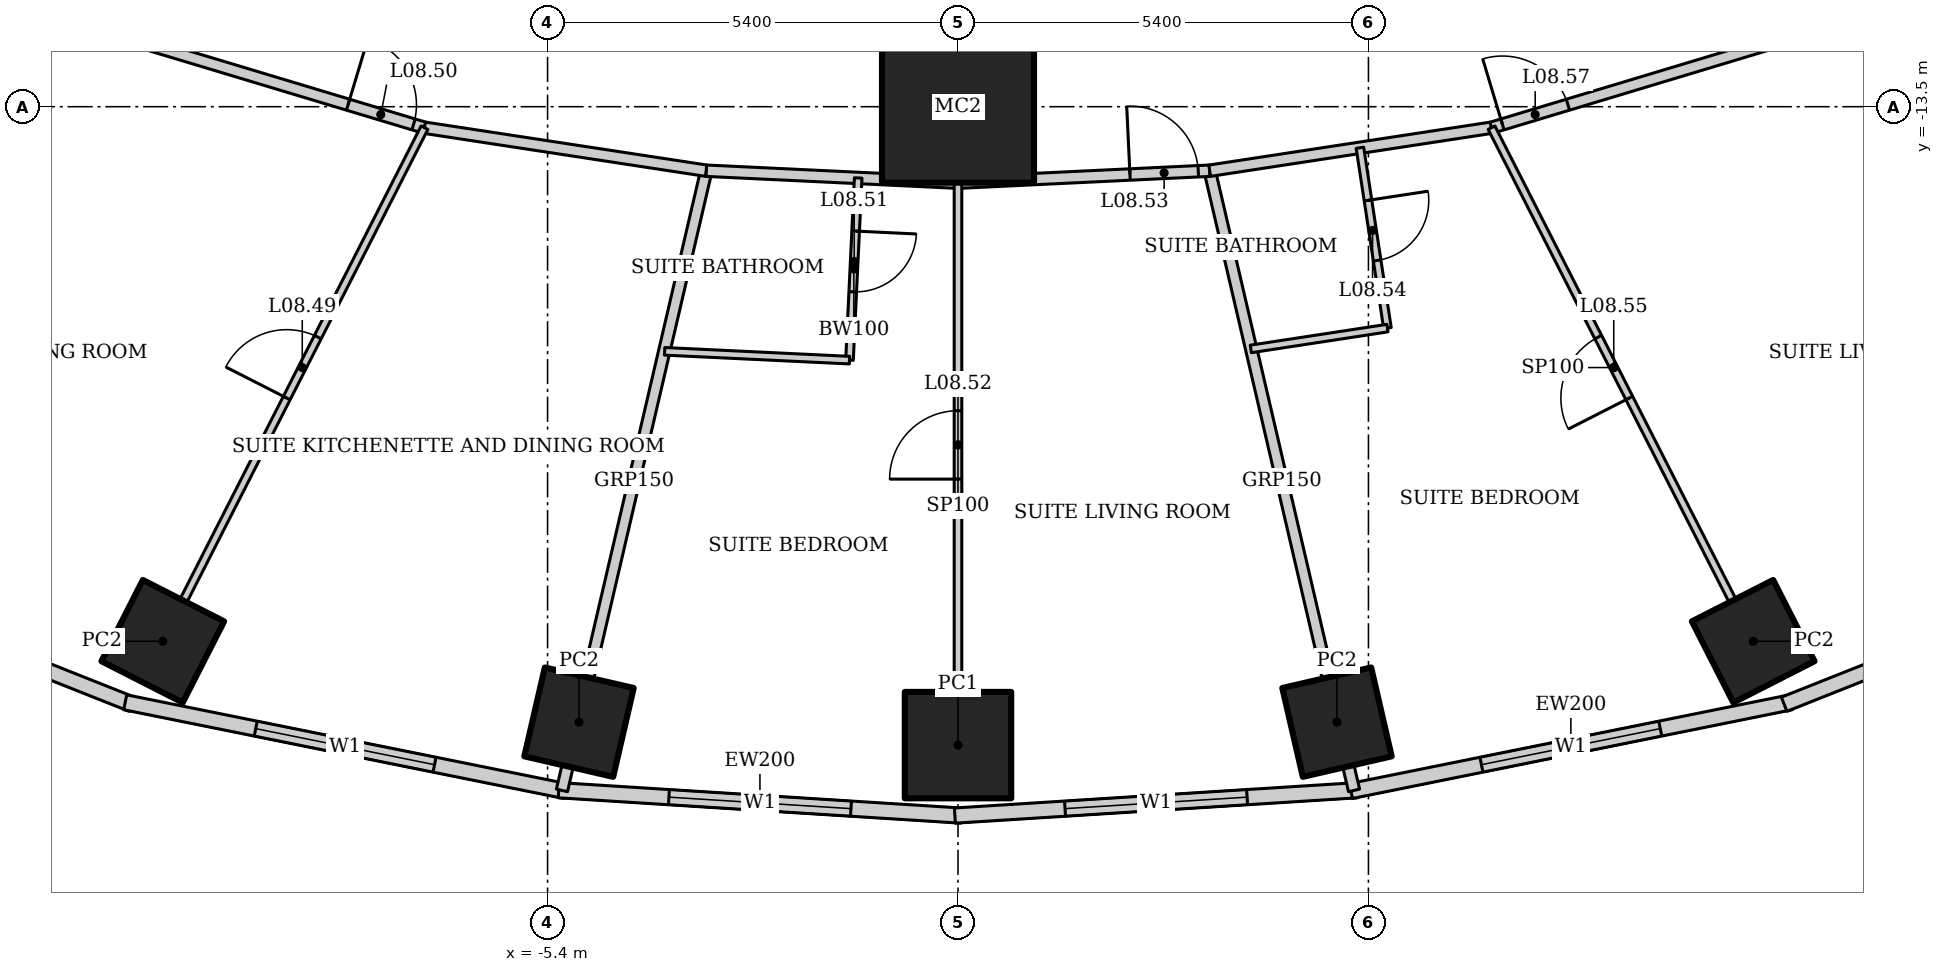
"""IFC4 building model, lengths in metres.
Left out: names, types, materials, properties, quantities, classifications, styles, units other than length and angle.
Written with IfcOpenShell. Run it as: python <this file> out.ifc"""

import sys

from ifc_helpers import new_model, si_unit, direction, frame, frame_2d, origin, origin_2d, place, context, subcontext, project, spatial, rectangle, hollow_rectangle, extrude, element, fill, save


model = new_model("IFC4")
c1 = context("Model", 3, precision=1e-05, world=origin(), true_north=direction((0.0, 1.0)))
c2 = subcontext(c1, "Body", "Model", "MODEL_VIEW")
j1 = project(units=[si_unit("LENGTHUNIT", "METRE"), si_unit("PLANEANGLEUNIT", "RADIAN")], contexts=[c1])
p1 = place(None, origin())
s1 = spatial("IfcSite", under=j1, at=p1, CompositionType="ELEMENT")
p2 = place(p1, origin())
s2 = spatial("IfcBuilding", under=s1, at=p2, CompositionType="ELEMENT")
p3 = place(p2, frame((0.0, 0.0, 44.2)))
s3 = spatial("IfcBuildingStorey", under=s2, at=p3, CompositionType="ELEMENT", Elevation=44.2)
p4 = place(p3, frame((0.0, -13.5, 0.0), z_axis=(0.0, 0.0, 1.0), x_axis=(1.0, 0.0, 0.0)))
e1 = element("IfcColumn", 1, at=p4, inside=s3, PredefinedType="COLUMN", context=c2, shape_type="SweptSolid", body=[
    extrude(hollow_rectangle(XDim=2.0, YDim=2.0, WallThickness=0.17, at=origin_2d()), origin(), (0.0, 0.0, 1.0), 3.6),
])
for number, where, z_axis, x_axis in (
    (2, (-10.463, -20.534, 0.0), (0.0, 0.0, 1.0), (0.454, 0.891, 0.0)),
    (3, (-4.986, -21.598, 0.0), (0.0, 0.0, 1.0), (0.225, 0.974, 0.0)),
):
    element("IfcColumn", number, at=place(p3, frame(where, z_axis=z_axis, x_axis=x_axis)), inside=s3, PredefinedType="COLUMN", context=c2, shape_type="SweptSolid", body=[
        extrude(hollow_rectangle(XDim=1.2, YDim=1.2, WallThickness=0.1, at=origin_2d()), origin(), (0.0, 0.0, 1.0), 3.6),
    ])
p5 = place(p3, frame((0.0, -21.9, 0.0), z_axis=(0.0, 0.0, 1.0), x_axis=(1.0, 0.0, 0.0)))
e4 = element("IfcColumn", 4, at=p5, inside=s3, PredefinedType="COLUMN", context=c2, shape_type="SweptSolid", body=[
    extrude(hollow_rectangle(XDim=1.4, YDim=1.4, WallThickness=0.1, at=origin_2d()), origin(), (0.0, 0.0, 1.0), 3.6),
])
for number, where, z_axis, x_axis in (
    (5, (4.986, -21.598, 0.0), (0.0, 0.0, 1.0), (0.974, 0.225, 0.0)),
    (6, (10.463, -20.534, 0.0), (0.0, 0.0, 1.0), (0.891, 0.454, 0.0)),
):
    element("IfcColumn", number, at=place(p3, frame(where, z_axis=z_axis, x_axis=x_axis)), inside=s3, PredefinedType="COLUMN", context=c2, shape_type="SweptSolid", body=[
        extrude(hollow_rectangle(XDim=1.2, YDim=1.2, WallThickness=0.1, at=origin_2d()), origin(), (0.0, 0.0, 1.0), 3.6),
    ])
p6 = place(p3, frame((-18.018, -18.523, 0.0), z_axis=(0.0, 0.0, 1.0), x_axis=(0.929358351251, -0.369178892895, 0.0)))
e7 = element("IfcWall", 7, at=p6, inside=s3, PredefinedType="SOLIDWALL", context=c2, shape_type="SweptSolid", body=[
    extrude(rectangle(XDim=7.692, YDim=0.2, at=frame_2d((3.846, 0.0))), origin(), (0.0, 0.0, 1.0), 3.45),
])
p7 = place(p6, frame((2.646, 0.0, 0.5)))
e8 = element("IfcOpeningElement", 8, at=p7, cuts=e7, PredefinedType="OPENING", context=c2, shape_type="SweptSolid", body=[
    extrude(rectangle(XDim=2.4, YDim=2.2, at=frame_2d((1.2, 1.1))), frame((0.0, 0.11, 0.0), z_axis=(0.0, -1.0, 0.0), x_axis=(1.0, 0.0, 0.0)), (0.0, 0.0, 1.0), 0.22),
])
p8 = place(p3, frame((-10.957, -21.337, 0.0), z_axis=(0.0, 0.0, 1.0), x_axis=(0.980251657452, -0.197754110105, 0.0)))
e9 = element("IfcWall", 9, at=p8, inside=s3, PredefinedType="SOLIDWALL", context=c2, shape_type="SweptSolid", body=[
    extrude(rectangle(XDim=5.904, YDim=0.2, at=frame_2d((2.952, 0.0))), origin(), (0.0, 0.0, 1.0), 3.45),
])
p9 = place(p8, frame((1.752, 0.0, 0.5)))
e10 = element("IfcOpeningElement", 10, at=p9, cuts=e9, PredefinedType="OPENING", context=c2, shape_type="SweptSolid", body=[
    extrude(rectangle(XDim=2.4, YDim=2.2, at=frame_2d((1.2, 1.1))), frame((0.0, 0.11, 0.0), z_axis=(0.0, -1.0, 0.0), x_axis=(1.0, 0.0, 0.0)), (0.0, 0.0, 1.0), 0.22),
])
p10 = place(p3, frame((-5.253, -22.493, 0.0), z_axis=(0.0, 0.0, 1.0), x_axis=(0.998018582375, -0.062919863585, 0.0)))
e11 = element("IfcWall", 11, at=p10, inside=s3, PredefinedType="SOLIDWALL", context=c2, shape_type="SweptSolid", body=[
    extrude(rectangle(XDim=5.304, YDim=0.2, at=frame_2d((2.652, 0.0))), origin(), (0.0, 0.0, 1.0), 3.45),
])
p11 = place(p10, frame((1.452, 0.0, 0.5)))
e12 = element("IfcOpeningElement", 12, at=p11, cuts=e11, PredefinedType="OPENING", context=c2, shape_type="SweptSolid", body=[
    extrude(rectangle(XDim=2.4, YDim=2.2, at=frame_2d((1.2, 1.1))), frame((0.0, 0.11, 0.0), z_axis=(0.0, -1.0, 0.0), x_axis=(1.0, 0.0, 0.0)), (0.0, 0.0, 1.0), 0.22),
])
p12 = place(p3, frame((-0.041, -22.827, 0.0), z_axis=(0.0, 0.0, 1.0), x_axis=(0.998018582375, 0.062919863585, 0.0)))
e13 = element("IfcWall", 13, at=p12, inside=s3, PredefinedType="SOLIDWALL", context=c2, shape_type="SweptSolid", body=[
    extrude(rectangle(XDim=5.304, YDim=0.2, at=frame_2d((2.652, 0.0))), origin(), (0.0, 0.0, 1.0), 3.45),
])
p13 = place(p12, frame((1.452, 0.0, 0.5)))
e14 = element("IfcOpeningElement", 14, at=p13, cuts=e13, PredefinedType="OPENING", context=c2, shape_type="SweptSolid", body=[
    extrude(rectangle(XDim=2.4, YDim=2.2, at=frame_2d((1.2, 1.1))), frame((0.0, 0.11, 0.0), z_axis=(0.0, -1.0, 0.0), x_axis=(1.0, 0.0, 0.0)), (0.0, 0.0, 1.0), 0.22),
])
p14 = place(p3, frame((5.17, -22.504, 0.0), z_axis=(0.0, 0.0, 1.0), x_axis=(0.980251657452, 0.197754110105, 0.0)))
e15 = element("IfcWall", 15, at=p14, inside=s3, PredefinedType="SOLIDWALL", context=c2, shape_type="SweptSolid", body=[
    extrude(rectangle(XDim=5.904, YDim=0.2, at=frame_2d((2.952, 0.0))), origin(), (0.0, 0.0, 1.0), 3.45),
])
p15 = place(p14, frame((1.752, 0.0, 0.5)))
e16 = element("IfcOpeningElement", 16, at=p15, cuts=e15, PredefinedType="OPENING", context=c2, shape_type="SweptSolid", body=[
    extrude(rectangle(XDim=2.4, YDim=2.2, at=frame_2d((1.2, 1.1))), frame((0.0, 0.11, 0.0), z_axis=(0.0, -1.0, 0.0), x_axis=(1.0, 0.0, 0.0)), (0.0, 0.0, 1.0), 0.22),
])
p16 = place(p3, frame((10.869, -21.363, 0.0), z_axis=(0.0, 0.0, 1.0), x_axis=(0.929358351251, 0.369178892895, 0.0)))
e17 = element("IfcWall", 17, at=p16, inside=s3, PredefinedType="SOLIDWALL", context=c2, shape_type="SweptSolid", body=[
    extrude(rectangle(XDim=7.692, YDim=0.2, at=frame_2d((3.846, 0.0))), origin(), (0.0, 0.0, 1.0), 3.45),
])
p17 = place(p16, frame((2.646, 0.0, 0.5)))
e18 = element("IfcOpeningElement", 18, at=p17, cuts=e17, PredefinedType="OPENING", context=c2, shape_type="SweptSolid", body=[
    extrude(rectangle(XDim=2.4, YDim=2.2, at=frame_2d((1.2, 1.1))), frame((0.0, 0.11, 0.0), z_axis=(0.0, -1.0, 0.0), x_axis=(1.0, 0.0, 0.0)), (0.0, 0.0, 1.0), 0.22),
])
for number, where, z_axis, x_axis in (
    (19, (-5.211, -22.496, 0.0), (0.0, 0.0, 1.0), (0.227, 0.974, 0.0)),
    (20, (5.211, -22.496, 0.0), (0.0, 0.0, 1.0), (-0.227, 0.974, 0.0)),
):
    element("IfcWall", number, at=place(p3, frame(where, z_axis=z_axis, x_axis=x_axis)), inside=s3, PredefinedType="PARTITIONING", context=c2, shape_type="SweptSolid", body=[
        extrude(rectangle(XDim=8.372, YDim=0.15, at=frame_2d((4.186, 0.0))), origin(), (0.0, 0.0, 1.0), 2.767),
    ])
p18 = place(p3, frame((-11.888, -12.311, 0.0), z_axis=(0.0, 0.0, 1.0), x_axis=(0.957564241242, -0.288219922793, 0.0)))
e21 = element("IfcWall", 21, at=p18, inside=s3, PredefinedType="PARTITIONING", context=c2, shape_type="SweptSolid", body=[
    extrude(rectangle(XDim=5.085, YDim=0.15, at=frame_2d((2.542, 0.0))), origin(), (0.0, 0.0, 1.0), 3.45),
])
p19 = place(p18, frame((4.035, 0.0, 0.0)))
e22 = element("IfcOpeningElement", 22, at=p19, cuts=e21, PredefinedType="OPENING", context=c2, shape_type="SweptSolid", body=[
    extrude(rectangle(XDim=0.9, YDim=2.1, at=frame_2d((0.45, 1.05))), frame((0.0, 0.085, 0.0), z_axis=(0.0, -1.0, 0.0), x_axis=(1.0, 0.0, 0.0)), (0.0, 0.0, 1.0), 0.17),
])
p20 = place(p3, frame((-7.019, -13.776, 0.0), z_axis=(0.0, 0.0, 1.0), x_axis=(0.988564270062, -0.150800145746, 0.0)))
e23 = element("IfcWall", 23, at=p20, inside=s3, PredefinedType="PARTITIONING", context=c2, shape_type="SweptSolid", body=[
    extrude(rectangle(XDim=3.751, YDim=0.15, at=frame_2d((1.875, 0.0))), origin(), (0.0, 0.0, 1.0), 3.45),
])
p21 = place(p3, frame((-3.311, -14.342, 0.0), z_axis=(0.0, 0.0, 1.0), x_axis=(0.998863968075, -0.047652631422, 0.0)))
e24 = element("IfcWall", 24, at=p21, inside=s3, PredefinedType="PARTITIONING", context=c2, shape_type="SweptSolid", body=[
    extrude(rectangle(XDim=3.315, YDim=0.15, at=frame_2d((1.657, 0.0))), origin(), (0.0, 0.0, 1.0), 3.45),
])
p22 = place(p3, frame((0.0, -14.5, 0.0), z_axis=(0.0, 0.0, 1.0), x_axis=(0.998863968075, 0.047652631422, 0.0)))
e25 = element("IfcWall", 25, at=p22, inside=s3, PredefinedType="PARTITIONING", context=c2, shape_type="SweptSolid", body=[
    extrude(rectangle(XDim=3.315, YDim=0.15, at=frame_2d((1.657, 0.0))), origin(), (0.0, 0.0, 1.0), 3.45),
])
p23 = place(p22, frame((2.265, 0.0, 0.0)))
e26 = element("IfcOpeningElement", 26, at=p23, cuts=e25, PredefinedType="OPENING", context=c2, shape_type="SweptSolid", body=[
    extrude(rectangle(XDim=0.9, YDim=2.1, at=frame_2d((0.45, 1.05))), frame((0.0, 0.085, 0.0), z_axis=(0.0, -1.0, 0.0), x_axis=(1.0, 0.0, 0.0)), (0.0, 0.0, 1.0), 0.17),
])
p24 = place(p3, frame((3.311, -14.342, 0.0), z_axis=(0.0, 0.0, 1.0), x_axis=(0.988564270062, 0.150800145746, 0.0)))
e27 = element("IfcWall", 27, at=p24, inside=s3, PredefinedType="PARTITIONING", context=c2, shape_type="SweptSolid", body=[
    extrude(rectangle(XDim=3.751, YDim=0.15, at=frame_2d((1.875, 0.0))), origin(), (0.0, 0.0, 1.0), 3.45),
])
p25 = place(p3, frame((7.019, -13.776, 0.0), z_axis=(0.0, 0.0, 1.0), x_axis=(0.957564241242, 0.288219922793, 0.0)))
e28 = element("IfcWall", 28, at=p25, inside=s3, PredefinedType="PARTITIONING", context=c2, shape_type="SweptSolid", body=[
    extrude(rectangle(XDim=5.085, YDim=0.15, at=frame_2d((2.542, 0.0))), origin(), (0.0, 0.0, 1.0), 3.45),
])
p26 = place(p25, frame((0.15, 0.0, 0.0)))
e29 = element("IfcOpeningElement", 29, at=p26, cuts=e28, PredefinedType="OPENING", context=c2, shape_type="SweptSolid", body=[
    extrude(rectangle(XDim=0.9, YDim=2.1, at=frame_2d((0.45, 1.05))), frame((0.0, 0.085, 0.0), z_axis=(0.0, -1.0, 0.0), x_axis=(1.0, 0.0, 0.0)), (0.0, 0.0, 1.0), 0.17),
])
p27 = place(p3, frame((-16.944, -17.545, 0.0), z_axis=(0.0, 0.0, 1.0), x_axis=(0.694669949151, 0.719328618746, 0.0)))
e30 = element("IfcWall", 30, at=p27, inside=s3, PredefinedType="PARTITIONING", context=c2, shape_type="SweptSolid", body=[
    extrude(rectangle(XDim=7.277, YDim=0.1, at=frame_2d((3.639, 0.0))), origin(), (0.0, 0.0, 1.0), 2.528),
])
p28 = place(p27, frame((3.189, 0.0, 0.0)))
e31 = element("IfcOpeningElement", 31, at=p28, cuts=e30, PredefinedType="OPENING", context=c2, shape_type="SweptSolid", body=[
    extrude(rectangle(XDim=0.9, YDim=2.1, at=frame_2d((0.45, 1.05))), frame((0.0, 0.06, 0.0), z_axis=(0.0, -1.0, 0.0), x_axis=(1.0, 0.0, 0.0)), (0.0, 0.0, 1.0), 0.12),
])
p29 = place(p3, frame((-10.236, -20.088, 0.0), z_axis=(0.0, 0.0, 1.0), x_axis=(0.454010445571, 0.890996360998, 0.0)))
e32 = element("IfcWall", 32, at=p29, inside=s3, PredefinedType="PARTITIONING", context=c2, shape_type="SweptSolid", body=[
    extrude(rectangle(XDim=7.084, YDim=0.1, at=frame_2d((3.542, 0.0))), origin(), (0.0, 0.0, 1.0), 2.528),
])
p30 = place(p29, frame((3.092, 0.0, 0.0)))
e33 = element("IfcOpeningElement", 33, at=p30, cuts=e32, PredefinedType="OPENING", context=c2, shape_type="SweptSolid", body=[
    extrude(rectangle(XDim=0.9, YDim=2.1, at=frame_2d((0.45, 1.05))), frame((0.0, 0.06, 0.0), z_axis=(0.0, -1.0, 0.0), x_axis=(1.0, 0.0, 0.0)), (0.0, 0.0, 1.0), 0.12),
])
p31 = place(p3, frame((-1.313, -14.438, 0.0), z_axis=(0.0, 0.0, 1.0), x_axis=(-0.047608648396, -0.998866065395, 0.0)))
e34 = element("IfcWall", 34, at=p31, inside=s3, PredefinedType="PARTITIONING", context=c2, shape_type="SweptSolid", body=[
    extrude(rectangle(XDim=2.4, YDim=0.1, at=frame_2d((1.2, 0.0))), origin(), (0.0, 0.0, 1.0), 3.45),
])
p32 = place(p31, frame((0.7, 0.0, 0.0)))
e35 = element("IfcOpeningElement", 35, at=p32, cuts=e34, PredefinedType="OPENING", context=c2, shape_type="SweptSolid", body=[
    extrude(rectangle(XDim=0.8, YDim=2.1, at=frame_2d((0.4, 1.05))), frame((0.0, 0.06, 0.0), z_axis=(0.0, -1.0, 0.0), x_axis=(1.0, 0.0, 0.0)), (0.0, 0.0, 1.0), 0.12),
])
p33 = place(p3, frame((-1.428, -16.835, 0.0), z_axis=(0.0, 0.0, 1.0), x_axis=(-0.998865186759, 0.047627079272, 0.0)))
e36 = element("IfcWall", 36, at=p33, inside=s3, PredefinedType="PARTITIONING", context=c2, shape_type="SweptSolid", body=[
    extrude(rectangle(XDim=2.435, YDim=0.1, at=frame_2d((1.217, 0.0))), origin(), (0.0, 0.0, 1.0), 3.45),
])
p34 = place(p3, frame((0.0, -21.4, 0.0), z_axis=(0.0, 0.0, 1.0), x_axis=(0.0, 1.0, 0.0)))
e37 = element("IfcWall", 37, at=p34, inside=s3, PredefinedType="PARTITIONING", context=c2, shape_type="SweptSolid", body=[
    extrude(rectangle(XDim=6.9, YDim=0.1, at=frame_2d((3.45, 0.0))), origin(), (0.0, 0.0, 1.0), 2.924),
])
p35 = place(p34, frame((3.0, 0.0, 0.0)))
e38 = element("IfcOpeningElement", 38, at=p35, cuts=e37, PredefinedType="OPENING", context=c2, shape_type="SweptSolid", body=[
    extrude(rectangle(XDim=0.9, YDim=2.1, at=frame_2d((0.45, 1.05))), frame((0.0, 0.06, 0.0), z_axis=(0.0, -1.0, 0.0), x_axis=(1.0, 0.0, 0.0)), (0.0, 0.0, 1.0), 0.12),
])
p36 = place(p3, frame((5.288, -14.041, 0.0), z_axis=(0.0, 0.0, 1.0), x_axis=(0.150757550564, -0.988570766788, 0.0)))
e39 = element("IfcWall", 39, at=p36, inside=s3, PredefinedType="PARTITIONING", context=c2, shape_type="SweptSolid", body=[
    extrude(rectangle(XDim=2.4, YDim=0.1, at=frame_2d((1.2, 0.0))), origin(), (0.0, 0.0, 1.0), 3.45),
])
p37 = place(p36, frame((0.7, 0.0, 0.0)))
e40 = element("IfcOpeningElement", 40, at=p37, cuts=e39, PredefinedType="OPENING", context=c2, shape_type="SweptSolid", body=[
    extrude(rectangle(XDim=0.8, YDim=2.1, at=frame_2d((0.4, 1.05))), frame((0.0, 0.06, 0.0), z_axis=(0.0, -1.0, 0.0), x_axis=(1.0, 0.0, 0.0)), (0.0, 0.0, 1.0), 0.12),
])
p38 = place(p3, frame((5.65, -16.413, 0.0), z_axis=(0.0, 0.0, 1.0), x_axis=(-0.988567991054, -0.150775750911, 0.0)))
e41 = element("IfcWall", 41, at=p38, inside=s3, PredefinedType="PARTITIONING", context=c2, shape_type="SweptSolid", body=[
    extrude(rectangle(XDim=1.818, YDim=0.1, at=frame_2d((0.909, 0.0))), origin(), (0.0, 0.0, 1.0), 3.45),
])
p39 = place(p3, frame((10.236, -20.088, 0.0), z_axis=(0.0, 0.0, 1.0), x_axis=(-0.454010445571, 0.890996360998, 0.0)))
e42 = element("IfcWall", 42, at=p39, inside=s3, PredefinedType="PARTITIONING", context=c2, shape_type="SweptSolid", body=[
    extrude(rectangle(XDim=7.084, YDim=0.1, at=frame_2d((3.542, 0.0))), origin(), (0.0, 0.0, 1.0), 2.528),
])
p40 = place(p39, frame((3.092, 0.0, 0.0)))
e43 = element("IfcOpeningElement", 43, at=p40, cuts=e42, PredefinedType="OPENING", context=c2, shape_type="SweptSolid", body=[
    extrude(rectangle(XDim=0.9, YDim=2.1, at=frame_2d((0.45, 1.05))), frame((0.0, 0.06, 0.0), z_axis=(0.0, -1.0, 0.0), x_axis=(1.0, 0.0, 0.0)), (0.0, 0.0, 1.0), 0.12),
])
p41 = place(p3, frame((16.944, -17.545, 0.0), z_axis=(0.0, 0.0, 1.0), x_axis=(-0.694669949151, 0.719328618746, 0.0)))
e44 = element("IfcWall", 44, at=p41, inside=s3, PredefinedType="PARTITIONING", context=c2, shape_type="SweptSolid", body=[
    extrude(rectangle(XDim=7.277, YDim=0.1, at=frame_2d((3.639, 0.0))), origin(), (0.0, 0.0, 1.0), 2.528),
])
p42 = place(p41, frame((3.189, 0.0, 0.0)))
e45 = element("IfcOpeningElement", 45, at=p42, cuts=e44, PredefinedType="OPENING", context=c2, shape_type="SweptSolid", body=[
    extrude(rectangle(XDim=0.9, YDim=2.1, at=frame_2d((0.45, 1.05))), frame((0.0, 0.06, 0.0), z_axis=(0.0, -1.0, 0.0), x_axis=(1.0, 0.0, 0.0)), (0.0, 0.0, 1.0), 0.12),
])
p43 = place(p9, origin())
e46 = element("IfcWindow", 46, at=p43, inside=s3, PartitioningType="SINGLE_PANEL", PredefinedType="WINDOW", context=c2, shape_type="SweptSolid", body=[
    extrude(rectangle(XDim=2.4, YDim=2.2, at=frame_2d((1.2, 1.1))), frame((0.0, 0.03, 0.0), z_axis=(0.0, -1.0, 0.0), x_axis=(1.0, 0.0, 0.0)), (0.0, 0.0, 1.0), 0.06),
])
fill(e10, e46)
p44 = place(p11, origin())
e47 = element("IfcWindow", 47, at=p44, inside=s3, PartitioningType="SINGLE_PANEL", PredefinedType="WINDOW", context=c2, shape_type="SweptSolid", body=[
    extrude(rectangle(XDim=2.4, YDim=2.2, at=frame_2d((1.2, 1.1))), frame((0.0, 0.03, 0.0), z_axis=(0.0, -1.0, 0.0), x_axis=(1.0, 0.0, 0.0)), (0.0, 0.0, 1.0), 0.06),
])
fill(e12, e47)
p45 = place(p13, origin())
e48 = element("IfcWindow", 48, at=p45, inside=s3, PartitioningType="SINGLE_PANEL", PredefinedType="WINDOW", context=c2, shape_type="SweptSolid", body=[
    extrude(rectangle(XDim=2.4, YDim=2.2, at=frame_2d((1.2, 1.1))), frame((0.0, 0.03, 0.0), z_axis=(0.0, -1.0, 0.0), x_axis=(1.0, 0.0, 0.0)), (0.0, 0.0, 1.0), 0.06),
])
fill(e14, e48)
p46 = place(p15, origin())
e49 = element("IfcWindow", 49, at=p46, inside=s3, PartitioningType="SINGLE_PANEL", PredefinedType="WINDOW", context=c2, shape_type="SweptSolid", body=[
    extrude(rectangle(XDim=2.4, YDim=2.2, at=frame_2d((1.2, 1.1))), frame((0.0, 0.03, 0.0), z_axis=(0.0, -1.0, 0.0), x_axis=(1.0, 0.0, 0.0)), (0.0, 0.0, 1.0), 0.06),
])
fill(e16, e49)
p47 = place(p30, origin())
e50 = element("IfcDoor", 50, at=p47, inside=s3, OperationType="SINGLE_SWING_LEFT", PredefinedType="DOOR", context=c2, shape_type="SweptSolid", body=[
    extrude(rectangle(XDim=0.9, YDim=2.1, at=frame_2d((0.45, 1.05))), frame((0.0, 0.025, 0.0), z_axis=(0.0, -1.0, 0.0), x_axis=(1.0, 0.0, 0.0)), (0.0, 0.0, 1.0), 0.05),
])
fill(e33, e50)
p48 = place(p19, origin())
e51 = element("IfcDoor", 51, at=p48, inside=s3, OperationType="SINGLE_SWING_LEFT", PredefinedType="DOOR", context=c2, shape_type="SweptSolid", body=[
    extrude(rectangle(XDim=0.9, YDim=2.1, at=frame_2d((0.45, 1.05))), frame((0.0, 0.025, 0.0), z_axis=(0.0, -1.0, 0.0), x_axis=(1.0, 0.0, 0.0)), (0.0, 0.0, 1.0), 0.05),
])
fill(e22, e51)
p49 = place(p32, origin())
e52 = element("IfcDoor", 52, at=p49, inside=s3, OperationType="SINGLE_SWING_LEFT", PredefinedType="DOOR", context=c2, shape_type="SweptSolid", body=[
    extrude(rectangle(XDim=0.8, YDim=2.1, at=frame_2d((0.4, 1.05))), frame((0.0, 0.025, 0.0), z_axis=(0.0, -1.0, 0.0), x_axis=(1.0, 0.0, 0.0)), (0.0, 0.0, 1.0), 0.05),
])
fill(e35, e52)
p50 = place(p35, origin())
e53 = element("IfcDoor", 53, at=p50, inside=s3, OperationType="SINGLE_SWING_LEFT", PredefinedType="DOOR", context=c2, shape_type="SweptSolid", body=[
    extrude(rectangle(XDim=0.9, YDim=2.1, at=frame_2d((0.45, 1.05))), frame((0.0, 0.025, 0.0), z_axis=(0.0, -1.0, 0.0), x_axis=(1.0, 0.0, 0.0)), (0.0, 0.0, 1.0), 0.05),
])
fill(e38, e53)
p51 = place(p23, origin())
e54 = element("IfcDoor", 54, at=p51, inside=s3, OperationType="SINGLE_SWING_LEFT", PredefinedType="DOOR", context=c2, shape_type="SweptSolid", body=[
    extrude(rectangle(XDim=0.9, YDim=2.1, at=frame_2d((0.45, 1.05))), frame((0.0, 0.025, 0.0), z_axis=(0.0, -1.0, 0.0), x_axis=(1.0, 0.0, 0.0)), (0.0, 0.0, 1.0), 0.05),
])
fill(e26, e54)
p52 = place(p37, origin())
e55 = element("IfcDoor", 55, at=p52, inside=s3, OperationType="SINGLE_SWING_LEFT", PredefinedType="DOOR", context=c2, shape_type="SweptSolid", body=[
    extrude(rectangle(XDim=0.8, YDim=2.1, at=frame_2d((0.4, 1.05))), frame((0.0, 0.025, 0.0), z_axis=(0.0, -1.0, 0.0), x_axis=(1.0, 0.0, 0.0)), (0.0, 0.0, 1.0), 0.05),
])
fill(e40, e55)
p53 = place(p40, origin())
e56 = element("IfcDoor", 56, at=p53, inside=s3, OperationType="SINGLE_SWING_LEFT", PredefinedType="DOOR", context=c2, shape_type="SweptSolid", body=[
    extrude(rectangle(XDim=0.9, YDim=2.1, at=frame_2d((0.45, 1.05))), frame((0.0, 0.025, 0.0), z_axis=(0.0, -1.0, 0.0), x_axis=(1.0, 0.0, 0.0)), (0.0, 0.0, 1.0), 0.05),
])
fill(e43, e56)
p54 = place(p26, origin())
e57 = element("IfcDoor", 57, at=p54, inside=s3, OperationType="SINGLE_SWING_LEFT", PredefinedType="DOOR", context=c2, shape_type="SweptSolid", body=[
    extrude(rectangle(XDim=0.9, YDim=2.1, at=frame_2d((0.45, 1.05))), frame((0.0, 0.025, 0.0), z_axis=(0.0, -1.0, 0.0), x_axis=(1.0, 0.0, 0.0)), (0.0, 0.0, 1.0), 0.05),
])
fill(e29, e57)
save(model, sys.argv[1])
